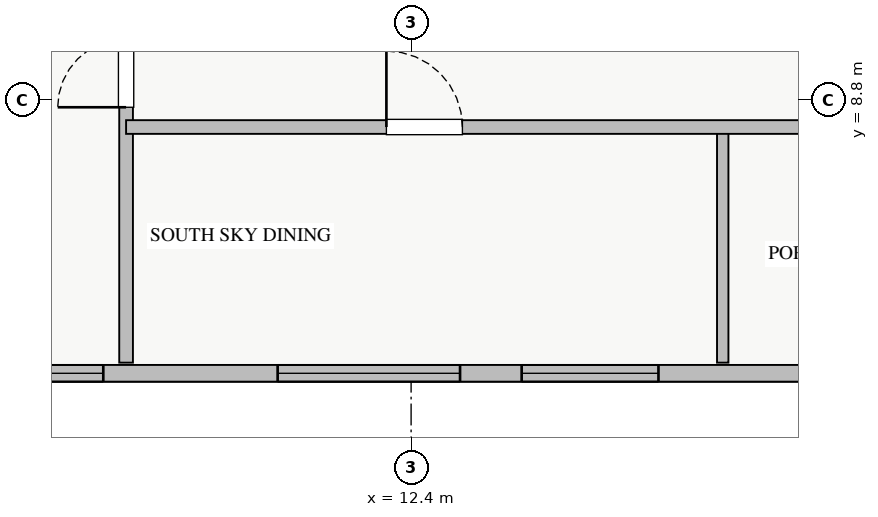
"""IFC4 building model, lengths in metres.
Left out: names, types, materials, properties, quantities, classifications, styles, units other than length and angle.
Written with IfcOpenShell. Run it as: python <this file> out.ifc"""

import sys

from ifc_helpers import new_model, si_unit, direction, frame, frame_2d, origin, place, context, subcontext, project, spatial, rectangle, extrude, source, transform, mapped, element, fill, save


model = new_model("IFC4")
c1 = context("Model", 3, precision=1e-05, world=origin(), true_north=direction((0.0, 1.0)))
c2 = subcontext(c1, "Body", "Model", "MODEL_VIEW")
j1 = project(units=[si_unit("LENGTHUNIT", "METRE"), si_unit("PLANEANGLEUNIT", "RADIAN")], contexts=[c1])
p1 = place(None, origin())
s1 = spatial("IfcSite", under=j1, at=p1, CompositionType="ELEMENT")
p2 = place(p1, origin())
s2 = spatial("IfcBuilding", under=s1, at=p2, CompositionType="ELEMENT")
p3 = place(p2, frame((0.0, 0.0, 156.75)))
s3 = spatial("IfcBuildingStorey", under=s2, at=p3, CompositionType="ELEMENT", Elevation=156.75)
p4 = place(p3, frame((6.55, 5.21, 0.0), z_axis=(0.0, 0.0, 1.0), x_axis=(1.0, 0.0, 0.0)))
e1 = element("IfcWall", 1, at=p4, inside=s3, PredefinedType="STANDARD", context=c2, shape_type="SweptSolid", body=[
    extrude(rectangle(XDim=24.9, YDim=0.22, at=frame_2d((12.45, 0.0))), origin(), (0.0, 0.0, 1.0), 2.61),
])
p5 = place(p4, frame((0.3, 0.0, 0.9)))
e2 = element("IfcOpeningElement", 2, at=p5, cuts=e1, PredefinedType="OPENING", context=c2, shape_type="SweptSolid", body=[
    extrude(rectangle(XDim=1.5, YDim=1.5, at=frame_2d((0.75, 0.75))), frame((0.0, 0.12, 0.0), z_axis=(0.0, -1.0, 0.0), x_axis=(1.0, 0.0, 0.0)), (0.0, 0.0, 1.0), 0.24),
])
p6 = place(p4, frame((7.304, 0.0, 0.9)))
e3 = element("IfcOpeningElement", 3, at=p6, cuts=e1, PredefinedType="OPENING", context=c2, shape_type="SweptSolid", body=[
    extrude(rectangle(XDim=1.8, YDim=1.5, at=frame_2d((0.9, 0.75))), frame((0.0, 0.12, 0.0), z_axis=(0.0, -1.0, 0.0), x_axis=(1.0, 0.0, 0.0)), (0.0, 0.0, 1.0), 0.24),
])
p7 = place(p4, frame((14.813, 0.0, 0.9)))
e4 = element("IfcOpeningElement", 4, at=p7, cuts=e1, PredefinedType="OPENING", context=c2, shape_type="SweptSolid", body=[
    extrude(rectangle(XDim=1.5, YDim=1.45, at=frame_2d((0.75, 0.725))), frame((0.0, 0.12, 0.0), z_axis=(0.0, -1.0, 0.0), x_axis=(1.0, 0.0, 0.0)), (0.0, 0.0, 1.0), 0.24),
])
p8 = place(p4, frame((20.738, 0.0, 0.9)))
e5 = element("IfcOpeningElement", 5, at=p8, cuts=e1, PredefinedType="OPENING", context=c2, shape_type="SweptSolid", body=[
    extrude(rectangle(XDim=2.1, YDim=1.48, at=frame_2d((1.05, 0.74))), frame((0.0, 0.12, 0.0), z_axis=(0.0, -1.0, 0.0), x_axis=(1.0, 0.0, 0.0)), (0.0, 0.0, 1.0), 0.24),
])
p9 = place(p4, frame((4.094, 0.0, 0.9)))
e6 = element("IfcOpeningElement", 6, at=p9, cuts=e1, PredefinedType="OPENING", context=c2, shape_type="SweptSolid", body=[
    extrude(rectangle(XDim=2.4, YDim=1.5, at=frame_2d((1.2, 0.75))), frame((0.0, 0.12, 0.0), z_axis=(0.0, -1.0, 0.0), x_axis=(1.0, 0.0, 0.0)), (0.0, 0.0, 1.0), 0.24),
])
p10 = place(p3, frame((8.65, 5.35, 0.0), z_axis=(0.0, 0.0, 1.0), x_axis=(0.0, 1.0, 0.0)))
e7 = element("IfcWall", 7, at=p10, inside=s3, PredefinedType="PARTITIONING", context=c2, shape_type="SweptSolid", body=[
    extrude(rectangle(XDim=11.35, YDim=0.18, at=frame_2d((5.675, 0.0))), origin(), (0.0, 0.0, 1.0), 3.07),
])
p11 = place(p10, frame((3.36, 0.0, 0.0)))
e8 = element("IfcOpeningElement", 8, at=p11, cuts=e7, PredefinedType="OPENING", context=c2, shape_type="SweptSolid", body=[
    extrude(rectangle(XDim=0.9, YDim=2.05, at=frame_2d((0.45, 1.025))), frame((0.0, 0.1, 0.0), z_axis=(0.0, -1.0, 0.0), x_axis=(1.0, 0.0, 0.0)), (0.0, 0.0, 1.0), 0.2),
])
p12 = place(p10, frame((5.585, 0.0, 0.0)))
e9 = element("IfcOpeningElement", 9, at=p12, cuts=e7, PredefinedType="OPENING", context=c2, shape_type="SweptSolid", body=[
    extrude(rectangle(XDim=1.0, YDim=2.05, at=frame_2d((0.5, 1.025))), frame((0.0, 0.1, 0.0), z_axis=(0.0, -1.0, 0.0), x_axis=(1.0, 0.0, 0.0)), (0.0, 0.0, 1.0), 0.2),
])
p13 = place(p3, frame((16.5, 5.35, 0.0), z_axis=(0.0, 0.0, 1.0), x_axis=(0.0, 1.0, 0.0)))
e10 = element("IfcWall", 10, at=p13, inside=s3, PredefinedType="PARTITIONING", context=c2, shape_type="SweptSolid", body=[
    extrude(rectangle(XDim=3.1, YDim=0.15, at=frame_2d((1.55, 0.0))), origin(), (0.0, 0.0, 1.0), 3.07),
])
p14 = place(p3, frame((8.65, 8.45, 0.0), z_axis=(0.0, 0.0, 1.0), x_axis=(1.0, 0.0, 0.0)))
e11 = element("IfcWall", 11, at=p14, inside=s3, PredefinedType="PARTITIONING", context=c2, shape_type="SweptSolid", body=[
    extrude(rectangle(XDim=23.8, YDim=0.18, at=frame_2d((11.9, 0.0))), origin(), (0.0, 0.0, 1.0), 3.07),
])
p15 = place(p14, frame((3.425, 0.0, 0.0)))
e12 = element("IfcOpeningElement", 12, at=p15, cuts=e11, PredefinedType="OPENING", context=c2, shape_type="SweptSolid", body=[
    extrude(rectangle(XDim=1.0, YDim=2.05, at=frame_2d((0.5, 1.025))), frame((0.0, 0.1, 0.0), z_axis=(0.0, -1.0, 0.0), x_axis=(1.0, 0.0, 0.0)), (0.0, 0.0, 1.0), 0.2),
])
p16 = place(p14, frame((11.6, 0.0, 0.0)))
e13 = element("IfcOpeningElement", 13, at=p16, cuts=e11, PredefinedType="OPENING", context=c2, shape_type="SweptSolid", body=[
    extrude(rectangle(XDim=1.0, YDim=2.05, at=frame_2d((0.5, 1.025))), frame((0.0, 0.1, 0.0), z_axis=(0.0, -1.0, 0.0), x_axis=(1.0, 0.0, 0.0)), (0.0, 0.0, 1.0), 0.2),
])
p17 = place(p14, frame((19.575, 0.0, 0.0)))
e14 = element("IfcOpeningElement", 14, at=p17, cuts=e11, PredefinedType="OPENING", context=c2, shape_type="SweptSolid", body=[
    extrude(rectangle(XDim=1.0, YDim=2.05, at=frame_2d((0.5, 1.025))), frame((0.0, 0.1, 0.0), z_axis=(0.0, -1.0, 0.0), x_axis=(1.0, 0.0, 0.0)), (0.0, 0.0, 1.0), 0.2),
])
m1 = source(origin(), c2, "Body", "SweptSolid", [
    extrude(rectangle(XDim=1.5, YDim=1.5, at=frame_2d((0.75, 0.75))), frame((0.0, 0.03, 0.0), z_axis=(0.0, -1.0, 0.0), x_axis=(1.0, 0.0, 0.0)), (0.0, 0.0, 1.0), 0.06),
])
p18 = place(p5, origin())
e15 = element("IfcWindow", 15, at=p18, inside=s3, PartitioningType="TRIPLE_PANEL_VERTICAL", PredefinedType="WINDOW", context=c2, shape_type="MappedRepresentation", body=[
    mapped(m1, transform((0.0, 0.0, 0.0), x_axis=(1.0, 0.0, 0.0), y_axis=(0.0, 1.0, 0.0), z_axis=(0.0, 0.0, 1.0), scale=1.0)),
])
fill(e2, e15)
m2 = source(origin(), c2, "Body", "SweptSolid", [
    extrude(rectangle(XDim=1.8, YDim=1.5, at=frame_2d((0.9, 0.75))), frame((0.0, 0.03, 0.0), z_axis=(0.0, -1.0, 0.0), x_axis=(1.0, 0.0, 0.0)), (0.0, 0.0, 1.0), 0.06),
])
p19 = place(p6, origin())
e16 = element("IfcWindow", 16, at=p19, inside=s3, PartitioningType="DOUBLE_PANEL_VERTICAL", PredefinedType="WINDOW", context=c2, shape_type="MappedRepresentation", body=[
    mapped(m2, transform((0.0, 0.0, 0.0), x_axis=(1.0, 0.0, 0.0), y_axis=(0.0, 1.0, 0.0), z_axis=(0.0, 0.0, 1.0), scale=1.0)),
])
fill(e3, e16)
m3 = source(origin(), c2, "Body", "SweptSolid", [
    extrude(rectangle(XDim=0.9, YDim=2.05, at=frame_2d((0.45, 1.025))), frame((0.0, 0.025, 0.0), z_axis=(0.0, -1.0, 0.0), x_axis=(1.0, 0.0, 0.0)), (0.0, 0.0, 1.0), 0.05),
])
p20 = place(p11, origin())
e17 = element("IfcDoor", 17, at=p20, inside=s3, OperationType="SINGLE_SWING_LEFT", PredefinedType="DOOR", context=c2, shape_type="MappedRepresentation", body=[
    mapped(m3, transform((0.0, 0.0, 0.0), x_axis=(1.0, 0.0, 0.0), y_axis=(0.0, 1.0, 0.0), z_axis=(0.0, 0.0, 1.0), scale=1.0)),
])
fill(e8, e17)
m4 = source(origin(), c2, "Body", "SweptSolid", [
    extrude(rectangle(XDim=1.0, YDim=2.05, at=frame_2d((0.5, 1.025))), frame((0.0, 0.025, 0.0), z_axis=(0.0, -1.0, 0.0), x_axis=(1.0, 0.0, 0.0)), (0.0, 0.0, 1.0), 0.05),
])
p21 = place(p15, origin())
e18 = element("IfcDoor", 18, at=p21, inside=s3, OperationType="SINGLE_SWING_LEFT", PredefinedType="DOOR", context=c2, shape_type="MappedRepresentation", body=[
    mapped(m4, transform((0.0, 0.0, 0.0), x_axis=(1.0, 0.0, 0.0), y_axis=(0.0, 1.0, 0.0), z_axis=(0.0, 0.0, 1.0), scale=1.0)),
])
fill(e12, e18)
m5 = source(origin(), c2, "Body", "SweptSolid", [
    extrude(rectangle(XDim=2.4, YDim=1.5, at=frame_2d((1.2, 0.75))), frame((0.0, 0.03, 0.0), z_axis=(0.0, -1.0, 0.0), x_axis=(1.0, 0.0, 0.0)), (0.0, 0.0, 1.0), 0.06),
])
p22 = place(p9, origin())
e19 = element("IfcWindow", 19, at=p22, inside=s3, PartitioningType="TRIPLE_PANEL_VERTICAL", PredefinedType="WINDOW", context=c2, shape_type="MappedRepresentation", body=[
    mapped(m5, transform((0.0, 0.0, 0.0), x_axis=(1.0, 0.0, 0.0), y_axis=(0.0, 1.0, 0.0), z_axis=(0.0, 0.0, 1.0), scale=1.0)),
])
fill(e6, e19)
save(model, sys.argv[1])
